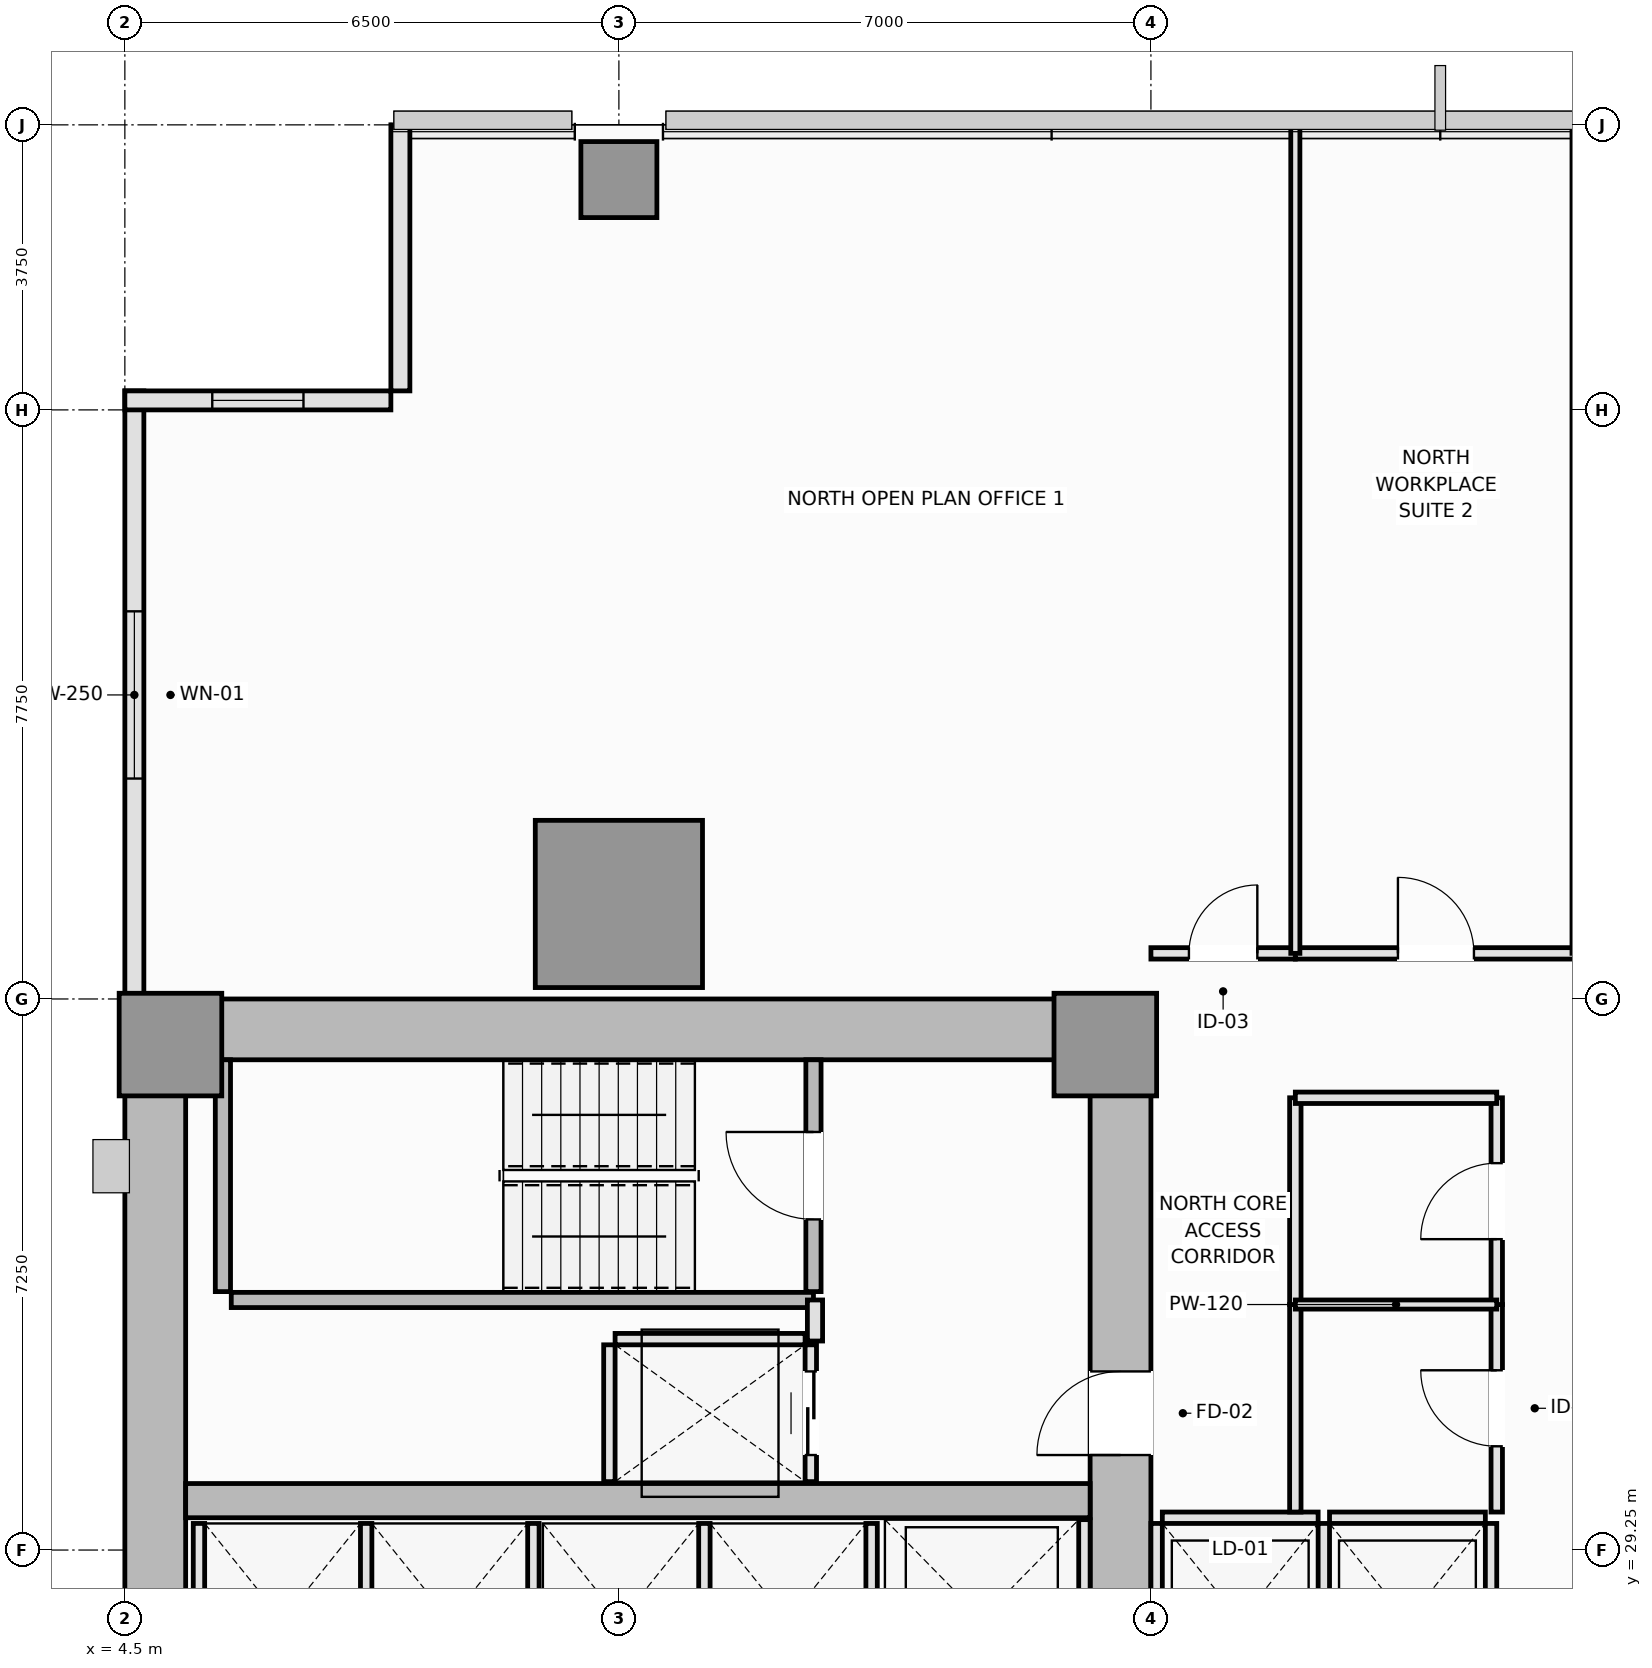
"""IFC4 building model, lengths in metres.
Left out: names, types, materials, properties, quantities, classifications, styles, units other than length and angle.
Written with IfcOpenShell. Run it as: python <this file> out.ifc"""

import sys

from ifc_helpers import new_model, si_unit, direction, frame, frame_2d, origin, origin_2d, place, context, subcontext, project, spatial, rectangle, extrude, element, fill, save


model = new_model("IFC4")
c1 = context("Model", 3, precision=1e-05, world=origin(), true_north=direction((0.0, 1.0)))
c2 = subcontext(c1, "Body", "Model", "MODEL_VIEW")
j1 = project(units=[si_unit("LENGTHUNIT", "METRE"), si_unit("PLANEANGLEUNIT", "RADIAN")], contexts=[c1])
p1 = place(None, origin())
s1 = spatial("IfcSite", under=j1, at=p1, CompositionType="ELEMENT")
p2 = place(p1, origin())
s2 = spatial("IfcBuilding", under=s1, at=p2, CompositionType="ELEMENT")
p3 = place(p2, frame((0.0, 0.0, 46.9)))
s3 = spatial("IfcBuildingStorey", under=s2, at=p3, CompositionType="ELEMENT", Elevation=46.9)
p4 = place(p3, frame((4.5, 36.1, 0.0), z_axis=(0.0, 0.0, 1.0), x_axis=(1.0, 0.0, 0.0)))
e1 = element("IfcWall", 1, at=p4, inside=s3, PredefinedType="SHEAR", context=c2, shape_type="SweptSolid", body=[
    extrude(rectangle(XDim=13.5, YDim=0.8, at=frame_2d((6.75, 0.0))), origin(), (0.0, 0.0, 1.0), 3.55),
])
p5 = place(p3, frame((4.9, 14.8, 0.0), z_axis=(0.0, 0.0, 1.0), x_axis=(0.0, 1.0, 0.0)))
e2 = element("IfcWall", 2, at=p5, inside=s3, PredefinedType="SHEAR", context=c2, shape_type="SweptSolid", body=[
    extrude(rectangle(XDim=20.9, YDim=0.8, at=frame_2d((10.45, 0.0))), origin(), (0.0, 0.0, 1.0), 3.55),
])
p6 = place(p3, frame((17.6, 27.05, 0.0), z_axis=(0.0, 0.0, 1.0), x_axis=(0.0, 1.0, 0.0)))
e3 = element("IfcWall", 3, at=p6, inside=s3, PredefinedType="SHEAR", context=c2, shape_type="SweptSolid", body=[
    extrude(rectangle(XDim=8.65, YDim=0.8, at=frame_2d((4.325, 0.0))), origin(), (0.0, 0.0, 1.0), 3.55),
])
p7 = place(p6, frame((3.45, 0.0, 0.0)))
e4 = element("IfcOpeningElement", 4, at=p7, cuts=e3, PredefinedType="OPENING", context=c2, shape_type="SweptSolid", body=[
    extrude(rectangle(XDim=1.1, YDim=2.15, at=frame_2d((0.55, 1.075))), frame((0.0, 0.41, 0.0), z_axis=(0.0, -1.0, 0.0), x_axis=(1.0, 0.0, 0.0)), (0.0, 0.0, 1.0), 0.82),
])
p8 = place(p3, frame((5.3, 29.9, 0.0), z_axis=(0.0, 0.0, 1.0), x_axis=(1.0, 0.0, 0.0)))
e5 = element("IfcWall", 5, at=p8, inside=s3, PredefinedType="SHEAR", context=c2, shape_type="SweptSolid", body=[
    extrude(rectangle(XDim=11.9, YDim=0.45, at=frame_2d((5.95, 0.0))), origin(), (0.0, 0.0, 1.0), 3.55),
])
for number, where, z_axis, x_axis in (
    (6, (5.1, 35.9, 0.0), (0.0, 0.0, 1.0), (1.0, 0.0, 0.0)),
    (7, (17.4, 35.9, 0.0), (0.0, 0.0, 1.0), (1.0, 0.0, 0.0)),
):
    element("IfcColumn", number, at=place(p3, frame(where, z_axis=z_axis, x_axis=x_axis)), inside=s3, PredefinedType="PILASTER", context=c2, shape_type="SweptSolid", body=[
        extrude(rectangle(XDim=1.35, YDim=1.35, at=origin_2d()), origin(), (0.0, 0.0, 1.0), 3.55),
    ])
p9 = place(p3, frame((11.0, 37.75, 0.0), z_axis=(0.0, 0.0, 1.0), x_axis=(1.0, 0.0, 0.0)))
e8 = element("IfcColumn", 8, at=p9, inside=s3, PredefinedType="COLUMN", context=c2, shape_type="SweptSolid", body=[
    extrude(rectangle(XDim=2.2, YDim=2.2, at=origin_2d()), origin(), (0.0, 0.0, 1.0), 3.55),
])
p10 = place(p3, frame((11.0, 47.28, 0.0), z_axis=(0.0, 0.0, 1.0), x_axis=(1.0, 0.0, 0.0)))
e9 = element("IfcColumn", 9, at=p10, inside=s3, PredefinedType="COLUMN", context=c2, shape_type="SweptSolid", body=[
    extrude(rectangle(XDim=1.0, YDim=1.0, at=origin_2d()), origin(), (0.0, 0.0, 1.0), 3.55),
])
p11 = place(p3, frame((4.625, 44.5, 0.0), z_axis=(0.0, 0.0, 1.0), x_axis=(0.0, -1.0, 0.0)))
e10 = element("IfcWall", 10, at=p11, inside=s3, PredefinedType="SOLIDWALL", context=c2, shape_type="SweptSolid", body=[
    extrude(rectangle(XDim=8.0, YDim=0.25, at=frame_2d((4.0, 0.0))), origin(), (0.0, 0.0, 1.0), 3.37),
])
p12 = place(p11, frame((2.9, 0.0, 0.9)))
e11 = element("IfcOpeningElement", 11, at=p12, cuts=e10, PredefinedType="OPENING", context=c2, shape_type="SweptSolid", body=[
    extrude(rectangle(XDim=2.2, YDim=1.8, at=frame_2d((1.1, 0.9))), frame((0.0, 0.135, 0.0), z_axis=(0.0, -1.0, 0.0), x_axis=(1.0, 0.0, 0.0)), (0.0, 0.0, 1.0), 0.27),
])
p13 = place(p3, frame((8.125, 48.0, 0.0), z_axis=(0.0, 0.0, 1.0), x_axis=(0.0, -1.0, 0.0)))
e12 = element("IfcWall", 12, at=p13, inside=s3, PredefinedType="SOLIDWALL", context=c2, shape_type="SweptSolid", body=[
    extrude(rectangle(XDim=3.5, YDim=0.25, at=frame_2d((1.75, 0.0))), origin(), (0.0, 0.0, 1.0), 3.37),
])
p14 = place(p3, frame((8.0, 44.375, 0.0), z_axis=(0.0, 0.0, 1.0), x_axis=(-1.0, 0.0, 0.0)))
e13 = element("IfcWall", 13, at=p14, inside=s3, PredefinedType="SOLIDWALL", context=c2, shape_type="SweptSolid", body=[
    extrude(rectangle(XDim=3.5, YDim=0.25, at=frame_2d((1.75, 0.0))), origin(), (0.0, 0.0, 1.0), 3.37),
])
p15 = place(p14, frame((1.15, 0.0, 0.9)))
e14 = element("IfcOpeningElement", 14, at=p15, cuts=e13, PredefinedType="OPENING", context=c2, shape_type="SweptSolid", body=[
    extrude(rectangle(XDim=1.2, YDim=1.8, at=frame_2d((0.6, 0.9))), frame((0.0, 0.135, 0.0), z_axis=(0.0, -1.0, 0.0), x_axis=(1.0, 0.0, 0.0)), (0.0, 0.0, 1.0), 0.27),
])
p16 = place(p3, frame((5.79, 32.65, 0.0), z_axis=(0.0, 0.0, 1.0), x_axis=(0.0, 1.0, 0.0)))
e15 = element("IfcWall", 15, at=p16, inside=s3, PredefinedType="SOLIDWALL", context=c2, shape_type="SweptSolid", body=[
    extrude(rectangle(XDim=3.05, YDim=0.2, at=frame_2d((1.525, 0.0))), origin(), (0.0, 0.0, 1.0), 3.55),
])
p17 = place(p3, frame((5.9, 32.54, 0.0), z_axis=(0.0, 0.0, 1.0), x_axis=(1.0, 0.0, 0.0)))
e16 = element("IfcWall", 16, at=p17, inside=s3, PredefinedType="SOLIDWALL", context=c2, shape_type="SweptSolid", body=[
    extrude(rectangle(XDim=7.66, YDim=0.2, at=frame_2d((3.83, 0.0))), origin(), (0.0, 0.0, 1.0), 3.55),
])
p18 = place(p3, frame((13.56, 32.65, 0.0), z_axis=(0.0, 0.0, 1.0), x_axis=(0.0, 1.0, 0.0)))
e17 = element("IfcWall", 17, at=p18, inside=s3, PredefinedType="SOLIDWALL", context=c2, shape_type="SweptSolid", body=[
    extrude(rectangle(XDim=3.05, YDim=0.2, at=frame_2d((1.525, 0.0))), origin(), (0.0, 0.0, 1.0), 3.55),
])
p19 = place(p18, frame((0.95, 0.0, 0.0)))
e18 = element("IfcOpeningElement", 18, at=p19, cuts=e17, PredefinedType="OPENING", context=c2, shape_type="SweptSolid", body=[
    extrude(rectangle(XDim=1.15, YDim=2.15, at=frame_2d((0.575, 1.075))), frame((0.0, 0.11, 0.0), z_axis=(0.0, -1.0, 0.0), x_axis=(1.0, 0.0, 0.0)), (0.0, 0.0, 1.0), 0.22),
])
p20 = place(p3, frame((18.15, 29.675, 0.0), z_axis=(0.0, 0.0, 1.0), x_axis=(1.0, 0.0, 0.0)))
e19 = element("IfcWall", 19, at=p20, inside=s3, PredefinedType="PARTITIONING", context=c2, shape_type="SweptSolid", body=[
    extrude(rectangle(XDim=2.05, YDim=0.15, at=frame_2d((1.025, 0.0))), origin(), (0.0, 0.0, 1.0), 3.37),
])
for number, where, z_axis, x_axis in (
    (20, (18.075, 27.05, 0.0), (0.0, 0.0, 1.0), (0.0, 1.0, 0.0)),
    (21, (20.275, 27.05, 0.0), (0.0, 0.0, 1.0), (0.0, 1.0, 0.0)),
):
    element("IfcWall", number, at=place(p3, frame(where, z_axis=z_axis, x_axis=x_axis)), inside=s3, PredefinedType="PARTITIONING", context=c2, shape_type="SweptSolid", body=[
        extrude(rectangle(XDim=2.55, YDim=0.15, at=frame_2d((1.275, 0.0))), origin(), (0.0, 0.0, 1.0), 3.37),
    ])
p21 = place(p3, frame((20.35, 29.675, 0.0), z_axis=(0.0, 0.0, 1.0), x_axis=(1.0, 0.0, 0.0)))
e22 = element("IfcWall", 22, at=p21, inside=s3, PredefinedType="PARTITIONING", context=c2, shape_type="SweptSolid", body=[
    extrude(rectangle(XDim=2.05, YDim=0.15, at=frame_2d((1.025, 0.0))), origin(), (0.0, 0.0, 1.0), 3.37),
])
for number, where, z_axis, x_axis in (
    (23, (22.475, 27.05, 0.0), (0.0, 0.0, 1.0), (0.0, 1.0, 0.0)),
    (24, (5.475, 27.05, 0.0), (0.0, 0.0, 1.0), (0.0, 1.0, 0.0)),
    (25, (7.675, 27.05, 0.0), (0.0, 0.0, 1.0), (0.0, 1.0, 0.0)),
    (26, (9.875, 27.05, 0.0), (0.0, 0.0, 1.0), (0.0, 1.0, 0.0)),
    (27, (12.125, 27.05, 0.0), (0.0, 0.0, 1.0), (0.0, 1.0, 0.0)),
    (28, (14.325, 27.05, 0.0), (0.0, 0.0, 1.0), (0.0, 1.0, 0.0)),
):
    element("IfcWall", number, at=place(p3, frame(where, z_axis=z_axis, x_axis=x_axis)), inside=s3, PredefinedType="PARTITIONING", context=c2, shape_type="SweptSolid", body=[
        extrude(rectangle(XDim=2.55, YDim=0.15, at=frame_2d((1.275, 0.0))), origin(), (0.0, 0.0, 1.0), 3.37),
    ])
p22 = place(p3, frame((17.125, 27.05, 0.0), z_axis=(0.0, 0.0, 1.0), x_axis=(0.0, 1.0, 0.0)))
e29 = element("IfcWall", 29, at=p22, inside=s3, PredefinedType="PARTITIONING", context=c2, shape_type="SweptSolid", body=[
    extrude(rectangle(XDim=2.6, YDim=0.15, at=frame_2d((1.3, 0.0))), origin(), (0.0, 0.0, 1.0), 3.37),
])
p23 = place(p3, frame((10.95, 32.025, 0.0), z_axis=(0.0, 0.0, 1.0), x_axis=(1.0, 0.0, 0.0)))
e30 = element("IfcWall", 30, at=p23, inside=s3, PredefinedType="PARTITIONING", context=c2, shape_type="SweptSolid", body=[
    extrude(rectangle(XDim=2.5, YDim=0.15, at=frame_2d((1.25, 0.0))), origin(), (0.0, 0.0, 1.0), 3.37),
])
p24 = place(p3, frame((10.875, 30.15, 0.0), z_axis=(0.0, 0.0, 1.0), x_axis=(0.0, 1.0, 0.0)))
e31 = element("IfcWall", 31, at=p24, inside=s3, PredefinedType="PARTITIONING", context=c2, shape_type="SweptSolid", body=[
    extrude(rectangle(XDim=1.8, YDim=0.15, at=frame_2d((0.9, 0.0))), origin(), (0.0, 0.0, 1.0), 3.37),
])
p25 = place(p3, frame((13.525, 30.15, 0.0), z_axis=(0.0, 0.0, 1.0), x_axis=(0.0, 1.0, 0.0)))
e32 = element("IfcWall", 32, at=p25, inside=s3, PredefinedType="PARTITIONING", context=c2, shape_type="SweptSolid", body=[
    extrude(rectangle(XDim=1.8, YDim=0.15, at=frame_2d((0.9, 0.0))), origin(), (0.0, 0.0, 1.0), 3.37),
])
p26 = place(p25, frame((0.35, 0.0, 0.0)))
e33 = element("IfcOpeningElement", 33, at=p26, cuts=e32, PredefinedType="OPENING", context=c2, shape_type="SweptSolid", body=[
    extrude(rectangle(XDim=1.1, YDim=2.2, at=frame_2d((0.55, 1.1))), frame((0.0, 0.085, 0.0), z_axis=(0.0, -1.0, 0.0), x_axis=(1.0, 0.0, 0.0)), (0.0, 0.0, 1.0), 0.17),
])
p27 = place(p3, frame((13.58, 32.0, 0.0), z_axis=(0.0, 0.0, 1.0), x_axis=(0.0, 1.0, 0.0)))
e34 = element("IfcWall", 34, at=p27, inside=s3, PredefinedType="PARTITIONING", context=c2, shape_type="SweptSolid", body=[
    extrude(rectangle(XDim=0.54, YDim=0.2, at=frame_2d((0.27, 0.0))), origin(), (0.0, 0.0, 1.0), 3.37),
])
p28 = place(p3, frame((22.55, 29.75, 0.0), z_axis=(0.0, 0.0, 1.0), x_axis=(0.0, 1.0, 0.0)))
e35 = element("IfcWall", 35, at=p28, inside=s3, PredefinedType="PARTITIONING", context=c2, shape_type="SweptSolid", body=[
    extrude(rectangle(XDim=2.73, YDim=0.15, at=frame_2d((1.365, 0.0))), origin(), (0.0, 0.0, 1.0), 3.01),
])
p29 = place(p28, frame((0.865, 0.0, 0.0)))
e36 = element("IfcOpeningElement", 36, at=p29, cuts=e35, PredefinedType="OPENING", context=c2, shape_type="SweptSolid", body=[
    extrude(rectangle(XDim=1.0, YDim=2.15, at=frame_2d((0.5, 1.075))), frame((0.0, 0.085, 0.0), z_axis=(0.0, -1.0, 0.0), x_axis=(1.0, 0.0, 0.0)), (0.0, 0.0, 1.0), 0.17),
])
p30 = place(p3, frame((22.55, 32.48, 0.0), z_axis=(0.0, 0.0, 1.0), x_axis=(0.0, 1.0, 0.0)))
e37 = element("IfcWall", 37, at=p30, inside=s3, PredefinedType="PARTITIONING", context=c2, shape_type="SweptSolid", body=[
    extrude(rectangle(XDim=2.72, YDim=0.15, at=frame_2d((1.36, 0.0))), origin(), (0.0, 0.0, 1.0), 3.01),
])
p31 = place(p30, frame((0.86, 0.0, 0.0)))
e38 = element("IfcOpeningElement", 38, at=p31, cuts=e37, PredefinedType="OPENING", context=c2, shape_type="SweptSolid", body=[
    extrude(rectangle(XDim=1.0, YDim=2.15, at=frame_2d((0.5, 1.075))), frame((0.0, 0.085, 0.0), z_axis=(0.0, -1.0, 0.0), x_axis=(1.0, 0.0, 0.0)), (0.0, 0.0, 1.0), 0.17),
])
p32 = place(p3, frame((19.9, 29.75, 0.0), z_axis=(0.0, 0.0, 1.0), x_axis=(0.0, 1.0, 0.0)))
e39 = element("IfcWall", 39, at=p32, inside=s3, PredefinedType="PARTITIONING", context=c2, shape_type="SweptSolid", body=[
    extrude(rectangle(XDim=2.73, YDim=0.15, at=frame_2d((1.365, 0.0))), origin(), (0.0, 0.0, 1.0), 3.37),
])
p33 = place(p3, frame((19.9, 32.48, 0.0), z_axis=(0.0, 0.0, 1.0), x_axis=(0.0, 1.0, 0.0)))
e40 = element("IfcWall", 40, at=p33, inside=s3, PredefinedType="PARTITIONING", context=c2, shape_type="SweptSolid", body=[
    extrude(rectangle(XDim=2.72, YDim=0.15, at=frame_2d((1.36, 0.0))), origin(), (0.0, 0.0, 1.0), 3.37),
])
p34 = place(p3, frame((19.9, 35.2, 0.0), z_axis=(0.0, 0.0, 1.0), x_axis=(1.0, 0.0, 0.0)))
e41 = element("IfcWall", 41, at=p34, inside=s3, PredefinedType="PARTITIONING", context=c2, shape_type="SweptSolid", body=[
    extrude(rectangle(XDim=2.65, YDim=0.15, at=frame_2d((1.325, 0.0))), origin(), (0.0, 0.0, 1.0), 3.37),
])
p35 = place(p3, frame((18.0, 37.1, 0.0), z_axis=(0.0, 0.0, 1.0), x_axis=(1.0, 0.0, 0.0)))
e42 = element("IfcWall", 42, at=p35, inside=s3, PredefinedType="PARTITIONING", context=c2, shape_type="SweptSolid", body=[
    extrude(rectangle(XDim=1.9, YDim=0.15, at=frame_2d((0.95, 0.0))), origin(), (0.0, 0.0, 1.0), 3.37),
])
p36 = place(p35, frame((0.5, 0.0, 0.0)))
e43 = element("IfcOpeningElement", 43, at=p36, cuts=e42, PredefinedType="OPENING", context=c2, shape_type="SweptSolid", body=[
    extrude(rectangle(XDim=0.9, YDim=2.1, at=frame_2d((0.45, 1.05))), frame((0.0, 0.085, 0.0), z_axis=(0.0, -1.0, 0.0), x_axis=(1.0, 0.0, 0.0)), (0.0, 0.0, 1.0), 0.17),
])
p37 = place(p3, frame((19.9, 37.1, 0.0), z_axis=(0.0, 0.0, 1.0), x_axis=(1.0, 0.0, 0.0)))
e44 = element("IfcWall", 44, at=p37, inside=s3, PredefinedType="PARTITIONING", context=c2, shape_type="SweptSolid", body=[
    extrude(rectangle(XDim=3.7, YDim=0.15, at=frame_2d((1.85, 0.0))), origin(), (0.0, 0.0, 1.0), 3.37),
])
p38 = place(p37, frame((1.35, 0.0, 0.0)))
e45 = element("IfcOpeningElement", 45, at=p38, cuts=e44, PredefinedType="OPENING", context=c2, shape_type="SweptSolid", body=[
    extrude(rectangle(XDim=1.0, YDim=2.15, at=frame_2d((0.5, 1.075))), frame((0.0, 0.085, 0.0), z_axis=(0.0, -1.0, 0.0), x_axis=(1.0, 0.0, 0.0)), (0.0, 0.0, 1.0), 0.17),
])
p39 = place(p3, frame((19.9, 32.48, 0.0), z_axis=(0.0, 0.0, 1.0), x_axis=(1.0, 0.0, 0.0)))
e46 = element("IfcWall", 46, at=p39, inside=s3, PredefinedType="PARTITIONING", context=c2, shape_type="SweptSolid", body=[
    extrude(rectangle(XDim=2.65, YDim=0.12, at=frame_2d((1.325, 0.0))), origin(), (0.0, 0.0, 1.0), 3.37),
])
for number, where, z_axis, x_axis in (
    (47, (19.9, 37.1, 0.0), (0.0, 0.0, 1.0), (0.0, 1.0, 0.0)),
    (48, (23.6, 37.1, 0.0), (0.0, 0.0, 1.0), (0.0, 1.0, 0.0)),
):
    element("IfcWall", number, at=place(p3, frame(where, z_axis=z_axis, x_axis=x_axis)), inside=s3, PredefinedType="PARTITIONING", context=c2, shape_type="SweptSolid", body=[
        extrude(rectangle(XDim=10.89, YDim=0.12, at=frame_2d((5.445, 0.0))), origin(), (0.0, 0.0, 1.0), 3.37),
    ])
p40 = place(p12, origin())
e49 = element("IfcWindow", 49, at=p40, inside=s3, PartitioningType="SINGLE_PANEL", PredefinedType="WINDOW", context=c2, shape_type="SweptSolid", body=[
    extrude(rectangle(XDim=2.2, YDim=1.8, at=frame_2d((1.1, 0.9))), frame((0.0, 0.03, 0.0), z_axis=(0.0, -1.0, 0.0), x_axis=(1.0, 0.0, 0.0)), (0.0, 0.0, 1.0), 0.06),
])
fill(e11, e49)
p41 = place(p15, origin())
e50 = element("IfcWindow", 50, at=p41, inside=s3, PartitioningType="SINGLE_PANEL", PredefinedType="WINDOW", context=c2, shape_type="SweptSolid", body=[
    extrude(rectangle(XDim=1.2, YDim=1.8, at=frame_2d((0.6, 0.9))), frame((0.0, 0.03, 0.0), z_axis=(0.0, -1.0, 0.0), x_axis=(1.0, 0.0, 0.0)), (0.0, 0.0, 1.0), 0.06),
])
fill(e14, e50)
p42 = place(p19, origin())
e51 = element("IfcDoor", 51, at=p42, inside=s3, OperationType="SINGLE_SWING_RIGHT", PredefinedType="DOOR", context=c2, shape_type="SweptSolid", body=[
    extrude(rectangle(XDim=1.15, YDim=2.15, at=frame_2d((0.575, 1.075))), frame((0.0, 0.025, 0.0), z_axis=(0.0, -1.0, 0.0), x_axis=(1.0, 0.0, 0.0)), (0.0, 0.0, 1.0), 0.05),
])
fill(e18, e51)
p43 = place(p26, origin())
e52 = element("IfcDoor", 52, at=p43, inside=s3, OperationType="DOUBLE_DOOR_SLIDING", PredefinedType="DOOR", context=c2, shape_type="SweptSolid", body=[
    extrude(rectangle(XDim=1.1, YDim=2.2, at=frame_2d((0.55, 1.1))), frame((0.0, 0.025, 0.0), z_axis=(0.0, -1.0, 0.0), x_axis=(1.0, 0.0, 0.0)), (0.0, 0.0, 1.0), 0.05),
])
fill(e33, e52)
p44 = place(p7, origin())
e53 = element("IfcDoor", 53, at=p44, inside=s3, OperationType="SINGLE_SWING_LEFT", PredefinedType="DOOR", context=c2, shape_type="SweptSolid", body=[
    extrude(rectangle(XDim=1.1, YDim=2.15, at=frame_2d((0.55, 1.075))), frame((0.0, 0.025, 0.0), z_axis=(0.0, -1.0, 0.0), x_axis=(1.0, 0.0, 0.0)), (0.0, 0.0, 1.0), 0.05),
])
fill(e4, e53)
p45 = place(p29, origin())
e54 = element("IfcDoor", 54, at=p45, inside=s3, OperationType="SINGLE_SWING_RIGHT", PredefinedType="DOOR", context=c2, shape_type="SweptSolid", body=[
    extrude(rectangle(XDim=1.0, YDim=2.15, at=frame_2d((0.5, 1.075))), frame((0.0, 0.025, 0.0), z_axis=(0.0, -1.0, 0.0), x_axis=(1.0, 0.0, 0.0)), (0.0, 0.0, 1.0), 0.05),
])
fill(e36, e54)
p46 = place(p31, origin())
e55 = element("IfcDoor", 55, at=p46, inside=s3, OperationType="SINGLE_SWING_LEFT", PredefinedType="DOOR", context=c2, shape_type="SweptSolid", body=[
    extrude(rectangle(XDim=1.0, YDim=2.15, at=frame_2d((0.5, 1.075))), frame((0.0, 0.025, 0.0), z_axis=(0.0, -1.0, 0.0), x_axis=(1.0, 0.0, 0.0)), (0.0, 0.0, 1.0), 0.05),
])
fill(e38, e55)
p47 = place(p36, origin())
e56 = element("IfcDoor", 56, at=p47, inside=s3, OperationType="SINGLE_SWING_RIGHT", PredefinedType="DOOR", context=c2, shape_type="SweptSolid", body=[
    extrude(rectangle(XDim=0.9, YDim=2.1, at=frame_2d((0.45, 1.05))), frame((0.0, 0.025, 0.0), z_axis=(0.0, -1.0, 0.0), x_axis=(1.0, 0.0, 0.0)), (0.0, 0.0, 1.0), 0.05),
])
fill(e43, e56)
p48 = place(p38, origin())
e57 = element("IfcDoor", 57, at=p48, inside=s3, OperationType="SINGLE_SWING_LEFT", PredefinedType="DOOR", context=c2, shape_type="SweptSolid", body=[
    extrude(rectangle(XDim=1.0, YDim=2.15, at=frame_2d((0.5, 1.075))), frame((0.0, 0.025, 0.0), z_axis=(0.0, -1.0, 0.0), x_axis=(1.0, 0.0, 0.0)), (0.0, 0.0, 1.0), 0.05),
])
fill(e45, e57)
save(model, sys.argv[1])
